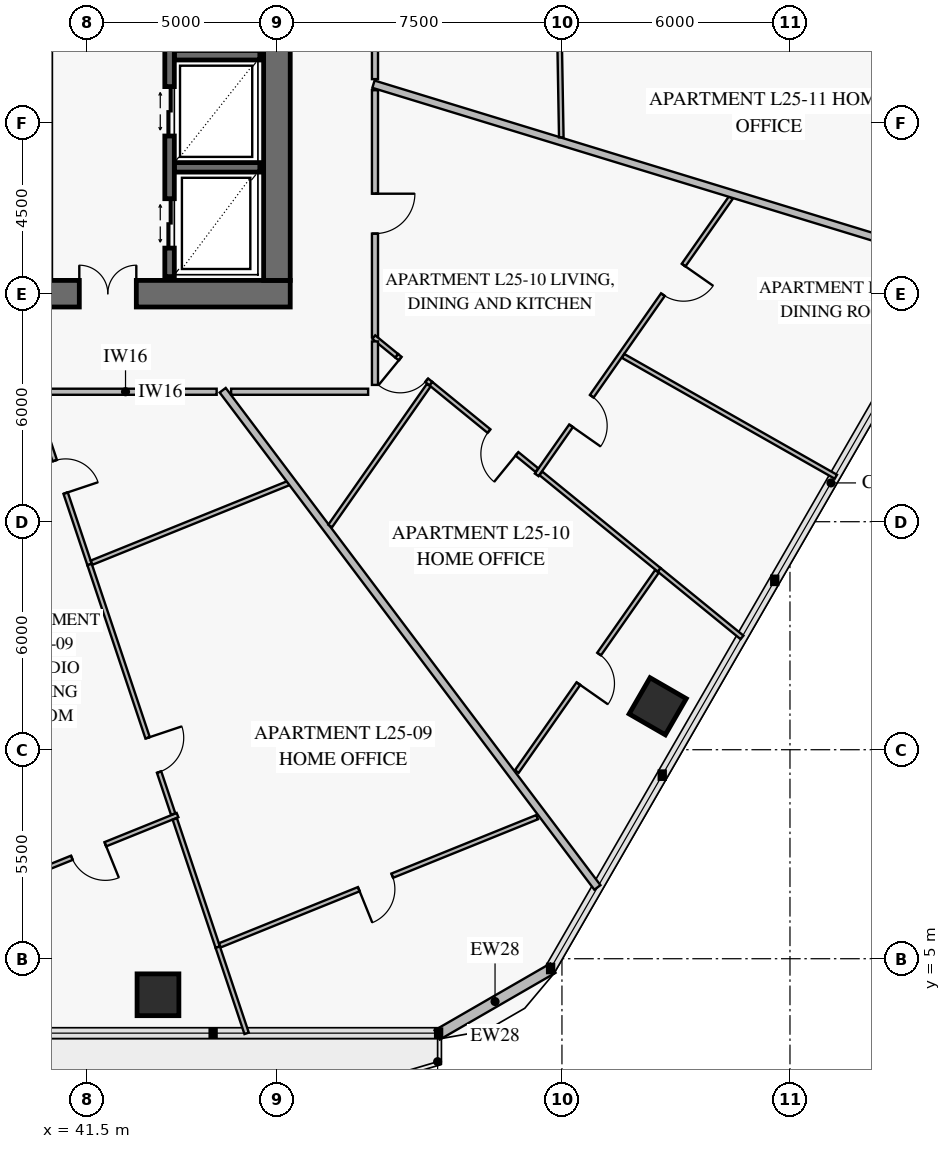
"""IFC4 building model, lengths in metres.
Left out: names, types, materials, properties, quantities, classifications, styles, units other than length and angle.
Written with IfcOpenShell. Run it as: python <this file> out.ifc"""

import sys

from ifc_helpers import new_model, si_unit, direction, frame, frame_2d, origin, origin_2d, place, context, subcontext, project, spatial, rectangle, extrude, element, fill, save


model = new_model("IFC4")
c1 = context("Model", 3, precision=1e-05, world=origin(), true_north=direction((0.0, 1.0)))
c2 = subcontext(c1, "Body", "Model", "MODEL_VIEW")
j1 = project(units=[si_unit("LENGTHUNIT", "METRE"), si_unit("PLANEANGLEUNIT", "RADIAN")], contexts=[c1])
p1 = place(None, origin())
s1 = spatial("IfcSite", under=j1, at=p1, CompositionType="ELEMENT")
p2 = place(p1, origin())
s2 = spatial("IfcBuilding", under=s1, at=p2, CompositionType="ELEMENT")
p3 = place(p2, frame((0.0, 0.0, 103.8)))
s3 = spatial("IfcBuildingStorey", under=s2, at=p3, CompositionType="ELEMENT", Elevation=103.8)
p4 = place(p3, frame((37.35, 22.5, 0.0), z_axis=(0.0, 0.0, 1.0), x_axis=(1.0, 0.0, 0.0)))
e1 = element("IfcWall", 1, at=p4, inside=s3, PredefinedType="SHEAR", context=c2, shape_type="SweptSolid", body=[
    extrude(rectangle(XDim=9.5, YDim=0.7, at=frame_2d((4.75, 0.0))), origin(), (0.0, 0.0, 1.0), 3.8),
])
p5 = place(p4, frame((3.95, 0.0, 0.0)))
e2 = element("IfcOpeningElement", 2, at=p5, cuts=e1, PredefinedType="OPENING", context=c2, shape_type="SweptSolid", body=[
    extrude(rectangle(XDim=1.5, YDim=2.15, at=frame_2d((0.75, 1.075))), frame((0.0, 0.362, 0.0), z_axis=(0.0, -1.0, 0.0), x_axis=(1.0, 0.0, 0.0)), (0.0, 0.0, 1.0), 0.724),
])
p6 = place(p3, frame((46.5, 22.85, 0.0), z_axis=(0.0, 0.0, 1.0), x_axis=(0.0, 1.0, 0.0)))
e3 = element("IfcWall", 3, at=p6, inside=s3, PredefinedType="SHEAR", context=c2, shape_type="SweptSolid", body=[
    extrude(rectangle(XDim=18.3, YDim=0.7, at=frame_2d((9.15, 0.0))), origin(), (0.0, 0.0, 1.0), 3.8),
])
p7 = place(p6, frame((8.9, 0.0, 0.0)))
e4 = element("IfcOpeningElement", 4, at=p7, cuts=e3, PredefinedType="OPENING", context=c2, shape_type="SweptSolid", body=[
    extrude(rectangle(XDim=1.1, YDim=2.15, at=frame_2d((0.55, 1.075))), frame((0.0, 0.362, 0.0), z_axis=(0.0, -1.0, 0.0), x_axis=(1.0, 0.0, 0.0)), (0.0, 0.0, 1.0), 0.724),
])
for number, where, z_axis, x_axis in (
    (5, (43.37, 4.052, 0.0), (0.0, 0.0, 1.0), (1.0, 0.0, 0.0)),
    (6, (56.519, 11.643, 0.0), (0.0, 0.0, 1.0), (0.5, 0.866, 0.0)),
):
    element("IfcColumn", number, at=place(p3, frame(where, z_axis=z_axis, x_axis=x_axis)), inside=s3, PredefinedType="COLUMN", context=c2, shape_type="SweptSolid", body=[
        extrude(rectangle(XDim=1.1, YDim=1.1, at=origin_2d()), origin(), (0.0, 0.0, 1.0), 3.55),
    ])
p8 = place(p3, frame((53.761, 4.751, 0.0), z_axis=(0.0, 0.0, 1.0), x_axis=(-0.866007452331, -0.500031091541, 0.0)))
e7 = element("IfcWall", 7, at=p8, inside=s3, PredefinedType="SOLIDWALL", context=c2, shape_type="SweptSolid", body=[
    extrude(rectangle(XDim=3.515, YDim=0.28, at=frame_2d((1.757, 0.0))), origin(), (0.0, 0.0, 1.0), 3.55),
])
for number, where, z_axis, x_axis in (
    (8, (43.8, 25.825, 0.0), (0.0, 0.0, 1.0), (1.0, 0.0, 0.0)),
    (9, (43.8, 28.775, 0.0), (0.0, 0.0, 1.0), (1.0, 0.0, 0.0)),
):
    element("IfcWall", number, at=place(p3, frame(where, z_axis=z_axis, x_axis=x_axis)), inside=s3, PredefinedType="SOLIDWALL", context=c2, shape_type="SweptSolid", body=[
        extrude(rectangle(XDim=2.25, YDim=0.25, at=frame_2d((1.125, 0.0))), origin(), (0.0, 0.0, 1.0), 3.8),
    ])
p9 = place(p3, frame((43.675, 22.95, 0.0), z_axis=(0.0, 0.0, 1.0), x_axis=(0.0, 1.0, 0.0)))
e10 = element("IfcWall", 10, at=p9, inside=s3, PredefinedType="SOLIDWALL", context=c2, shape_type="SweptSolid", body=[
    extrude(rectangle(XDim=8.2, YDim=0.25, at=frame_2d((4.1, 0.0))), origin(), (0.0, 0.0, 1.0), 3.8),
])
p10 = place(p9, frame((0.75, 0.0, 0.0)))
e11 = element("IfcOpeningElement", 11, at=p10, cuts=e10, PredefinedType="OPENING", context=c2, shape_type="SweptSolid", body=[
    extrude(rectangle(XDim=1.3, YDim=2.3, at=frame_2d((0.65, 1.15))), frame((0.0, 0.137, 0.0), z_axis=(0.0, -1.0, 0.0), x_axis=(1.0, 0.0, 0.0)), (0.0, 0.0, 1.0), 0.274),
])
p11 = place(p9, frame((3.7, 0.0, 0.0)))
e12 = element("IfcOpeningElement", 12, at=p11, cuts=e10, PredefinedType="OPENING", context=c2, shape_type="SweptSolid", body=[
    extrude(rectangle(XDim=1.3, YDim=2.3, at=frame_2d((0.65, 1.15))), frame((0.0, 0.137, 0.0), z_axis=(0.0, -1.0, 0.0), x_axis=(1.0, 0.0, 0.0)), (0.0, 0.0, 1.0), 0.274),
])
p12 = place(p9, frame((6.62, 0.0, 0.0)))
e13 = element("IfcOpeningElement", 13, at=p12, cuts=e10, PredefinedType="OPENING", context=c2, shape_type="SweptSolid", body=[
    extrude(rectangle(XDim=0.9, YDim=2.1, at=frame_2d((0.45, 1.05))), frame((0.0, 0.137, 0.0), z_axis=(0.0, -1.0, 0.0), x_axis=(1.0, 0.0, 0.0)), (0.0, 0.0, 1.0), 0.274),
])
p13 = place(p3, frame((39.205, 6.889, 0.0), z_axis=(0.0, 0.0, 1.0), x_axis=(0.927186587095, 0.3745998301, 0.0)))
e14 = element("IfcWall", 14, at=p13, inside=s3, PredefinedType="PARTITIONING", context=c2, shape_type="SweptSolid", body=[
    extrude(rectangle(XDim=5.046, YDim=0.12, at=frame_2d((2.523, 0.0))), origin(), (0.0, 0.0, 1.0), 2.85),
])
p14 = place(p13, frame((2.048, 0.0, 0.0)))
e15 = element("IfcOpeningElement", 15, at=p14, cuts=e14, PredefinedType="OPENING", context=c2, shape_type="SweptSolid", body=[
    extrude(rectangle(XDim=0.95, YDim=2.1, at=frame_2d((0.475, 1.05))), frame((0.0, 0.072, 0.0), z_axis=(0.0, -1.0, 0.0), x_axis=(1.0, 0.0, 0.0)), (0.0, 0.0, 1.0), 0.144),
])
p15 = place(p3, frame((40.238, 19.35, 0.0), z_axis=(0.0, 0.0, 1.0), x_axis=(0.317607066426, -0.948222416607, 0.0)))
e16 = element("IfcWall", 16, at=p15, inside=s3, PredefinedType="PARTITIONING", context=c2, shape_type="SweptSolid", body=[
    extrude(rectangle(XDim=4.194, YDim=0.12, at=frame_2d((2.097, 0.0))), origin(), (0.0, 0.0, 1.0), 3.55),
])
p16 = place(p15, frame((1.311, 0.0, 0.0)))
e17 = element("IfcOpeningElement", 17, at=p16, cuts=e16, PredefinedType="OPENING", context=c2, shape_type="SweptSolid", body=[
    extrude(rectangle(XDim=0.9, YDim=2.1, at=frame_2d((0.45, 1.05))), frame((0.0, 0.072, 0.0), z_axis=(0.0, -1.0, 0.0), x_axis=(1.0, 0.0, 0.0)), (0.0, 0.0, 1.0), 0.144),
])
p17 = place(p3, frame((41.57, 15.373, 0.0), z_axis=(0.0, 0.0, 1.0), x_axis=(0.317623415575, -0.948216940303, 0.0)))
e18 = element("IfcWall", 18, at=p17, inside=s3, PredefinedType="PARTITIONING", context=c2, shape_type="SweptSolid", body=[
    extrude(rectangle(XDim=6.926, YDim=0.12, at=frame_2d((3.463, 0.0))), origin(), (0.0, 0.0, 1.0), 3.1),
])
p18 = place(p17, frame((4.81, 0.0, 0.0)))
e19 = element("IfcOpeningElement", 19, at=p18, cuts=e18, PredefinedType="OPENING", context=c2, shape_type="SweptSolid", body=[
    extrude(rectangle(XDim=0.95, YDim=2.1, at=frame_2d((0.475, 1.05))), frame((0.0, 0.072, 0.0), z_axis=(0.0, -1.0, 0.0), x_axis=(1.0, 0.0, 0.0)), (0.0, 0.0, 1.0), 0.144),
])
p19 = place(p3, frame((43.813, 8.677, 0.0), z_axis=(0.0, 0.0, 1.0), x_axis=(0.317627204672, -0.948215671065, 0.0)))
e20 = element("IfcWall", 20, at=p19, inside=s3, PredefinedType="PARTITIONING", context=c2, shape_type="SweptSolid", body=[
    extrude(rectangle(XDim=3.558, YDim=0.12, at=frame_2d((1.779, 0.0))), origin(), (0.0, 0.0, 1.0), 3.55),
])
p20 = place(p3, frame((44.998, 5.353, 0.0), z_axis=(0.0, 0.0, 1.0), x_axis=(0.927180810677, 0.374614127221, 0.0)))
e21 = element("IfcWall", 21, at=p20, inside=s3, PredefinedType="PARTITIONING", context=c2, shape_type="SweptSolid", body=[
    extrude(rectangle(XDim=9.004, YDim=0.12, at=frame_2d((4.502, 0.0))), origin(), (0.0, 0.0, 1.0), 2.8),
])
p21 = place(p20, frame((3.943, 0.0, 0.0)))
e22 = element("IfcOpeningElement", 22, at=p21, cuts=e21, PredefinedType="OPENING", context=c2, shape_type="SweptSolid", body=[
    extrude(rectangle(XDim=0.95, YDim=2.1, at=frame_2d((0.475, 1.05))), frame((0.0, 0.072, 0.0), z_axis=(0.0, -1.0, 0.0), x_axis=(1.0, 0.0, 0.0)), (0.0, 0.0, 1.0), 0.144),
])
p22 = place(p3, frame((53.335, 17.732, 0.0), z_axis=(0.0, 0.0, 1.0), x_axis=(0.573576398243, 0.819152070972, 0.0)))
e23 = element("IfcWall", 23, at=p22, inside=s3, PredefinedType="PARTITIONING", context=c2, shape_type="SweptSolid", body=[
    extrude(rectangle(XDim=8.907, YDim=0.12, at=frame_2d((4.453, 0.0))), origin(), (0.0, 0.0, 1.0), 3.55),
])
p23 = place(p22, frame((1.576, 0.0, 0.0)))
e24 = element("IfcOpeningElement", 24, at=p23, cuts=e23, PredefinedType="OPENING", context=c2, shape_type="SweptSolid", body=[
    extrude(rectangle(XDim=0.95, YDim=2.1, at=frame_2d((0.475, 1.05))), frame((0.0, 0.072, 0.0), z_axis=(0.0, -1.0, 0.0), x_axis=(1.0, 0.0, 0.0)), (0.0, 0.0, 1.0), 0.144),
])
p24 = place(p22, frame((5.789, 0.0, 0.0)))
e25 = element("IfcOpeningElement", 25, at=p24, cuts=e23, PredefinedType="OPENING", context=c2, shape_type="SweptSolid", body=[
    extrude(rectangle(XDim=0.95, YDim=2.1, at=frame_2d((0.475, 1.05))), frame((0.0, 0.072, 0.0), z_axis=(0.0, -1.0, 0.0), x_axis=(1.0, 0.0, 0.0)), (0.0, 0.0, 1.0), 0.144),
])
p25 = place(p3, frame((49.65, 20.867, 0.0), z_axis=(0.0, 0.0, 1.0), x_axis=(0.775048691625, -0.631901515752, 0.0)))
e26 = element("IfcWall", 26, at=p25, inside=s3, PredefinedType="PARTITIONING", context=c2, shape_type="SweptSolid", body=[
    extrude(rectangle(XDim=1.165, YDim=0.12, at=frame_2d((0.583, 0.0))), origin(), (0.0, 0.0, 1.0), 3.55),
])
p26 = place(p25, frame((0.12, 0.0, 0.0)))
e27 = element("IfcOpeningElement", 27, at=p26, cuts=e26, PredefinedType="OPENING", context=c2, shape_type="SweptSolid", body=[
    extrude(rectangle(XDim=0.9, YDim=2.1, at=frame_2d((0.45, 1.05))), frame((0.0, 0.072, 0.0), z_axis=(0.0, -1.0, 0.0), x_axis=(1.0, 0.0, 0.0)), (0.0, 0.0, 1.0), 0.144),
])
p27 = place(p3, frame((50.553, 20.131, 0.0), z_axis=(0.0, 0.0, 1.0), x_axis=(0.7749603795, -0.632009818124, 0.0)))
e28 = element("IfcWall", 28, at=p27, inside=s3, PredefinedType="PARTITIONING", context=c2, shape_type="SweptSolid", body=[
    extrude(rectangle(XDim=3.597, YDim=0.12, at=frame_2d((1.798, 0.0))), origin(), (0.0, 0.0, 1.0), 3.1),
])
p28 = place(p27, frame((1.971, 0.0, 0.0)))
e29 = element("IfcOpeningElement", 29, at=p28, cuts=e28, PredefinedType="OPENING", context=c2, shape_type="SweptSolid", body=[
    extrude(rectangle(XDim=0.95, YDim=2.1, at=frame_2d((0.475, 1.05))), frame((0.0, 0.072, 0.0), z_axis=(0.0, -1.0, 0.0), x_axis=(1.0, 0.0, 0.0)), (0.0, 0.0, 1.0), 0.144),
])
p29 = place(p3, frame((53.446, 17.771, 0.0), z_axis=(0.0, 0.0, 1.0), x_axis=(0.774958236323, -0.632012446045, 0.0)))
e30 = element("IfcWall", 30, at=p29, inside=s3, PredefinedType="PARTITIONING", context=c2, shape_type="SweptSolid", body=[
    extrude(rectangle(XDim=4.017, YDim=0.12, at=frame_2d((2.009, 0.0))), origin(), (0.0, 0.0, 1.0), 3.55),
])
p30 = place(p3, frame((52.812, 9.926, 0.0), z_axis=(0.0, 0.0, 1.0), x_axis=(0.573569367982, 0.819156993569, 0.0)))
e31 = element("IfcWall", 31, at=p30, inside=s3, PredefinedType="PARTITIONING", context=c2, shape_type="SweptSolid", body=[
    extrude(rectangle(XDim=6.43, YDim=0.12, at=frame_2d((3.215, 0.0))), origin(), (0.0, 0.0, 1.0), 2.85),
])
p31 = place(p30, frame((2.824, 0.0, 0.0)))
e32 = element("IfcOpeningElement", 32, at=p31, cuts=e31, PredefinedType="OPENING", context=c2, shape_type="SweptSolid", body=[
    extrude(rectangle(XDim=0.95, YDim=2.1, at=frame_2d((0.475, 1.05))), frame((0.0, 0.072, 0.0), z_axis=(0.0, -1.0, 0.0), x_axis=(1.0, 0.0, 0.0)), (0.0, 0.0, 1.0), 0.144),
])
p32 = place(p3, frame((49.08, 21.358, 0.0), z_axis=(0.0, 0.0, 1.0), x_axis=(0.0, 1.0, 0.0)))
e33 = element("IfcWall", 33, at=p32, inside=s3, PredefinedType="PARTITIONING", context=c2, shape_type="SweptSolid", body=[
    extrude(rectangle(XDim=6.497, YDim=0.16, at=frame_2d((3.249, 0.0))), origin(), (0.0, 0.0, 1.0), 3.55),
])
p33 = place(p32, frame((2.723, 0.0, 0.0)))
e34 = element("IfcOpeningElement", 34, at=p33, cuts=e33, PredefinedType="OPENING", context=c2, shape_type="SweptSolid", body=[
    extrude(rectangle(XDim=1.05, YDim=2.15, at=frame_2d((0.525, 1.075))), frame((0.0, 0.092, 0.0), z_axis=(0.0, -1.0, 0.0), x_axis=(1.0, 0.0, 0.0)), (0.0, 0.0, 1.0), 0.184),
])
p34 = place(p3, frame((44.943, 5.303, 0.0), z_axis=(0.0, 0.0, 1.0), x_axis=(0.317697926169, -0.948191978297, 0.0)))
e35 = element("IfcWall", 35, at=p34, inside=s3, PredefinedType="PARTITIONING", context=c2, shape_type="SweptSolid", body=[
    extrude(rectangle(XDim=2.391, YDim=0.12, at=frame_2d((1.195, 0.0))), origin(), (0.0, 0.0, 1.0), 2.8),
])
p35 = place(p3, frame((41.625, 15.423, 0.0), z_axis=(0.0, 0.0, 1.0), x_axis=(0.927188436263, 0.374595253121, 0.0)))
e36 = element("IfcWall", 36, at=p35, inside=s3, PredefinedType="PARTITIONING", context=c2, shape_type="SweptSolid", body=[
    extrude(rectangle(XDim=5.618, YDim=0.12, at=frame_2d((2.809, 0.0))), origin(), (0.0, 0.0, 1.0), 3.55),
])
p36 = place(p3, frame((45.073, 19.96, 0.0), z_axis=(0.0, 0.0, 1.0), x_axis=(0.60181525353, -0.798635336445, 0.0)))
e37 = element("IfcWall", 37, at=p36, inside=s3, PredefinedType="PARTITIONING", context=c2, shape_type="SweptSolid", body=[
    extrude(rectangle(XDim=16.384, YDim=0.2, at=frame_2d((8.192, 0.0))), origin(), (0.0, 0.0, 1.0), 2.8),
])
p37 = place(p3, frame((55.61, 20.862, 0.0), z_axis=(0.0, 0.0, 1.0), x_axis=(0.869533184144, -0.493874520169, 0.0)))
e38 = element("IfcWall", 38, at=p37, inside=s3, PredefinedType="PARTITIONING", context=c2, shape_type="SweptSolid", body=[
    extrude(rectangle(XDim=6.437, YDim=0.12, at=frame_2d((3.219, 0.0))), origin(), (0.0, 0.0, 1.0), 2.8),
])
p38 = place(p3, frame((49.048, 21.358, 0.0), z_axis=(0.0, 0.0, 1.0), x_axis=(0.774881234923, -0.63210685154, 0.0)))
e39 = element("IfcWall", 39, at=p38, inside=s3, PredefinedType="PARTITIONING", context=c2, shape_type="SweptSolid", body=[
    extrude(rectangle(XDim=0.776, YDim=0.12, at=frame_2d((0.388, 0.0))), origin(), (0.0, 0.0, 1.0), 3.55),
])
p39 = place(p3, frame((56.559, 15.233, 0.0), z_axis=(0.0, 0.0, 1.0), x_axis=(0.774954560458, -0.632016953274, 0.0)))
e40 = element("IfcWall", 40, at=p39, inside=s3, PredefinedType="PARTITIONING", context=c2, shape_type="SweptSolid", body=[
    extrude(rectangle(XDim=2.812, YDim=0.12, at=frame_2d((1.406, 0.0))), origin(), (0.0, 0.0, 1.0), 2.8),
])
p40 = place(p3, frame((47.901, 16.387, 0.0), z_axis=(0.0, 0.0, 1.0), x_axis=(0.573556554724, 0.819165965195, 0.0)))
e41 = element("IfcWall", 41, at=p40, inside=s3, PredefinedType="PARTITIONING", context=c2, shape_type="SweptSolid", body=[
    extrude(rectangle(XDim=4.522, YDim=0.12, at=frame_2d((2.261, 0.0))), origin(), (0.0, 0.0, 1.0), 2.85),
])
p41 = place(p3, frame((49.04, 28.013, 0.0), z_axis=(0.0, 0.0, 1.0), x_axis=(0.956308788135, -0.292358515757, 0.0)))
e42 = element("IfcWall", 42, at=p41, inside=s3, PredefinedType="PARTITIONING", context=c2, shape_type="SweptSolid", body=[
    extrude(rectangle(XDim=16.084, YDim=0.2, at=frame_2d((8.042, 0.0))), origin(), (0.0, 0.0, 1.0), 2.8),
])
p42 = place(p3, frame((53.982, 26.615, 0.0), z_axis=(0.0, 0.0, 1.0), x_axis=(-0.017478660109, 0.999847236552, 0.0)))
e43 = element("IfcWall", 43, at=p42, inside=s3, PredefinedType="PARTITIONING", context=c2, shape_type="SweptSolid", body=[
    extrude(rectangle(XDim=4.316, YDim=0.12, at=frame_2d((2.158, 0.0))), origin(), (0.0, 0.0, 1.0), 2.85),
])
p43 = place(p3, frame((40.118, 19.92, 0.0), z_axis=(0.0, 0.0, 1.0), x_axis=(1.0, 0.0, 0.0)))
e44 = element("IfcWall", 44, at=p43, inside=s3, PredefinedType="PARTITIONING", context=c2, shape_type="SweptSolid", body=[
    extrude(rectangle(XDim=4.795, YDim=0.16, at=frame_2d((2.398, 0.0))), origin(), (0.0, 0.0, 1.0), 3.55),
])
p44 = place(p3, frame((45.294, 19.92, 0.0), z_axis=(0.0, 0.0, 1.0), x_axis=(1.0, 0.0, 0.0)))
e45 = element("IfcWall", 45, at=p44, inside=s3, PredefinedType="PARTITIONING", context=c2, shape_type="SweptSolid", body=[
    extrude(rectangle(XDim=3.605, YDim=0.16, at=frame_2d((1.803, 0.0))), origin(), (0.0, 0.0, 1.0), 2.85),
])
p45 = place(p3, frame((49.08, 20.1, 0.0), z_axis=(0.0, 0.0, 1.0), x_axis=(0.0, 1.0, 0.0)))
e46 = element("IfcWall", 46, at=p45, inside=s3, PredefinedType="PARTITIONING", context=c2, shape_type="SweptSolid", body=[
    extrude(rectangle(XDim=1.144, YDim=0.16, at=frame_2d((0.572, 0.0))), origin(), (0.0, 0.0, 1.0), 3.55),
])
p46 = place(p3, frame((49.08, 28.146, 0.0), z_axis=(0.0, 0.0, 1.0), x_axis=(0.0, 1.0, 0.0)))
e47 = element("IfcWall", 47, at=p46, inside=s3, PredefinedType="PARTITIONING", context=c2, shape_type="SweptSolid", body=[
    extrude(rectangle(XDim=3.054, YDim=0.16, at=frame_2d((1.527, 0.0))), origin(), (0.0, 0.0, 1.0), 2.85),
])
p47 = place(p5, origin())
e48 = element("IfcDoor", 48, at=p47, inside=s3, OperationType="DOUBLE_DOOR_SINGLE_SWING", PredefinedType="DOOR", context=c2, shape_type="SweptSolid", body=[
    extrude(rectangle(XDim=1.5, YDim=2.15, at=frame_2d((0.75, 1.075))), frame((0.0, 0.025, 0.0), z_axis=(0.0, -1.0, 0.0), x_axis=(1.0, 0.0, 0.0)), (0.0, 0.0, 1.0), 0.05),
])
fill(e2, e48)
p48 = place(p10, origin())
e49 = element("IfcDoor", 49, at=p48, inside=s3, OperationType="DOUBLE_DOOR_SLIDING", PredefinedType="DOOR", context=c2, shape_type="SweptSolid", body=[
    extrude(rectangle(XDim=1.3, YDim=2.3, at=frame_2d((0.65, 1.15))), frame((0.0, 0.025, 0.0), z_axis=(0.0, -1.0, 0.0), x_axis=(1.0, 0.0, 0.0)), (0.0, 0.0, 1.0), 0.05),
])
fill(e11, e49)
p49 = place(p11, origin())
e50 = element("IfcDoor", 50, at=p49, inside=s3, OperationType="DOUBLE_DOOR_SLIDING", PredefinedType="DOOR", context=c2, shape_type="SweptSolid", body=[
    extrude(rectangle(XDim=1.3, YDim=2.3, at=frame_2d((0.65, 1.15))), frame((0.0, 0.025, 0.0), z_axis=(0.0, -1.0, 0.0), x_axis=(1.0, 0.0, 0.0)), (0.0, 0.0, 1.0), 0.05),
])
fill(e12, e50)
p50 = place(p14, frame((0.95, 0.0, 0.0), z_axis=(0.0, 0.0, 1.0), x_axis=(-1.0, 0.0, 0.0)))
e51 = element("IfcDoor", 51, at=p50, inside=s3, OperationType="SINGLE_SWING_LEFT", PredefinedType="DOOR", context=c2, shape_type="SweptSolid", body=[
    extrude(rectangle(XDim=0.95, YDim=2.1, at=frame_2d((0.475, 1.05))), frame((0.0, 0.025, 0.0), z_axis=(0.0, -1.0, 0.0), x_axis=(1.0, 0.0, 0.0)), (0.0, 0.0, 1.0), 0.05),
])
fill(e15, e51)
p51 = place(p16, origin())
e52 = element("IfcDoor", 52, at=p51, inside=s3, OperationType="SINGLE_SWING_RIGHT", PredefinedType="DOOR", context=c2, shape_type="SweptSolid", body=[
    extrude(rectangle(XDim=0.9, YDim=2.1, at=frame_2d((0.45, 1.05))), frame((0.0, 0.025, 0.0), z_axis=(0.0, -1.0, 0.0), x_axis=(1.0, 0.0, 0.0)), (0.0, 0.0, 1.0), 0.05),
])
fill(e17, e52)
p52 = place(p18, origin())
e53 = element("IfcDoor", 53, at=p52, inside=s3, OperationType="SINGLE_SWING_LEFT", PredefinedType="DOOR", context=c2, shape_type="SweptSolid", body=[
    extrude(rectangle(XDim=0.95, YDim=2.1, at=frame_2d((0.475, 1.05))), frame((0.0, 0.025, 0.0), z_axis=(0.0, -1.0, 0.0), x_axis=(1.0, 0.0, 0.0)), (0.0, 0.0, 1.0), 0.05),
])
fill(e19, e53)
p53 = place(p21, frame((0.95, 0.0, 0.0), z_axis=(0.0, 0.0, 1.0), x_axis=(-1.0, 0.0, 0.0)))
e54 = element("IfcDoor", 54, at=p53, inside=s3, OperationType="SINGLE_SWING_RIGHT", PredefinedType="DOOR", context=c2, shape_type="SweptSolid", body=[
    extrude(rectangle(XDim=0.95, YDim=2.1, at=frame_2d((0.475, 1.05))), frame((0.0, 0.025, 0.0), z_axis=(0.0, -1.0, 0.0), x_axis=(1.0, 0.0, 0.0)), (0.0, 0.0, 1.0), 0.05),
])
fill(e22, e54)
p54 = place(p23, frame((0.95, 0.0, 0.0), z_axis=(0.0, 0.0, 1.0), x_axis=(-1.0, 0.0, 0.0)))
e55 = element("IfcDoor", 55, at=p54, inside=s3, OperationType="SINGLE_SWING_RIGHT", PredefinedType="DOOR", context=c2, shape_type="SweptSolid", body=[
    extrude(rectangle(XDim=0.95, YDim=2.1, at=frame_2d((0.475, 1.05))), frame((0.0, 0.025, 0.0), z_axis=(0.0, -1.0, 0.0), x_axis=(1.0, 0.0, 0.0)), (0.0, 0.0, 1.0), 0.05),
])
fill(e24, e55)
p55 = place(p24, frame((0.95, 0.0, 0.0), z_axis=(0.0, 0.0, 1.0), x_axis=(-1.0, 0.0, 0.0)))
e56 = element("IfcDoor", 56, at=p55, inside=s3, OperationType="SINGLE_SWING_LEFT", PredefinedType="DOOR", context=c2, shape_type="SweptSolid", body=[
    extrude(rectangle(XDim=0.95, YDim=2.1, at=frame_2d((0.475, 1.05))), frame((0.0, 0.025, 0.0), z_axis=(0.0, -1.0, 0.0), x_axis=(1.0, 0.0, 0.0)), (0.0, 0.0, 1.0), 0.05),
])
fill(e25, e56)
p56 = place(p26, frame((0.9, 0.0, 0.0), z_axis=(0.0, 0.0, 1.0), x_axis=(-1.0, 0.0, 0.0)))
e57 = element("IfcDoor", 57, at=p56, inside=s3, OperationType="SINGLE_SWING_RIGHT", PredefinedType="DOOR", context=c2, shape_type="SweptSolid", body=[
    extrude(rectangle(XDim=0.9, YDim=2.1, at=frame_2d((0.45, 1.05))), frame((0.0, 0.025, 0.0), z_axis=(0.0, -1.0, 0.0), x_axis=(1.0, 0.0, 0.0)), (0.0, 0.0, 1.0), 0.05),
])
fill(e27, e57)
p57 = place(p28, frame((0.95, 0.0, 0.0), z_axis=(0.0, 0.0, 1.0), x_axis=(-1.0, 0.0, 0.0)))
e58 = element("IfcDoor", 58, at=p57, inside=s3, OperationType="SINGLE_SWING_LEFT", PredefinedType="DOOR", context=c2, shape_type="SweptSolid", body=[
    extrude(rectangle(XDim=0.95, YDim=2.1, at=frame_2d((0.475, 1.05))), frame((0.0, 0.025, 0.0), z_axis=(0.0, -1.0, 0.0), x_axis=(1.0, 0.0, 0.0)), (0.0, 0.0, 1.0), 0.05),
])
fill(e29, e58)
p58 = place(p31, frame((0.95, 0.0, 0.0), z_axis=(0.0, 0.0, 1.0), x_axis=(-1.0, 0.0, 0.0)))
e59 = element("IfcDoor", 59, at=p58, inside=s3, OperationType="SINGLE_SWING_RIGHT", PredefinedType="DOOR", context=c2, shape_type="SweptSolid", body=[
    extrude(rectangle(XDim=0.95, YDim=2.1, at=frame_2d((0.475, 1.05))), frame((0.0, 0.025, 0.0), z_axis=(0.0, -1.0, 0.0), x_axis=(1.0, 0.0, 0.0)), (0.0, 0.0, 1.0), 0.05),
])
fill(e32, e59)
p59 = place(p33, frame((1.05, 0.0, 0.0), z_axis=(0.0, 0.0, 1.0), x_axis=(-1.0, 0.0, 0.0)))
e60 = element("IfcDoor", 60, at=p59, inside=s3, OperationType="SINGLE_SWING_LEFT", PredefinedType="DOOR", context=c2, shape_type="SweptSolid", body=[
    extrude(rectangle(XDim=1.05, YDim=2.15, at=frame_2d((0.525, 1.075))), frame((0.0, 0.025, 0.0), z_axis=(0.0, -1.0, 0.0), x_axis=(1.0, 0.0, 0.0)), (0.0, 0.0, 1.0), 0.05),
])
fill(e34, e60)
save(model, sys.argv[1])
